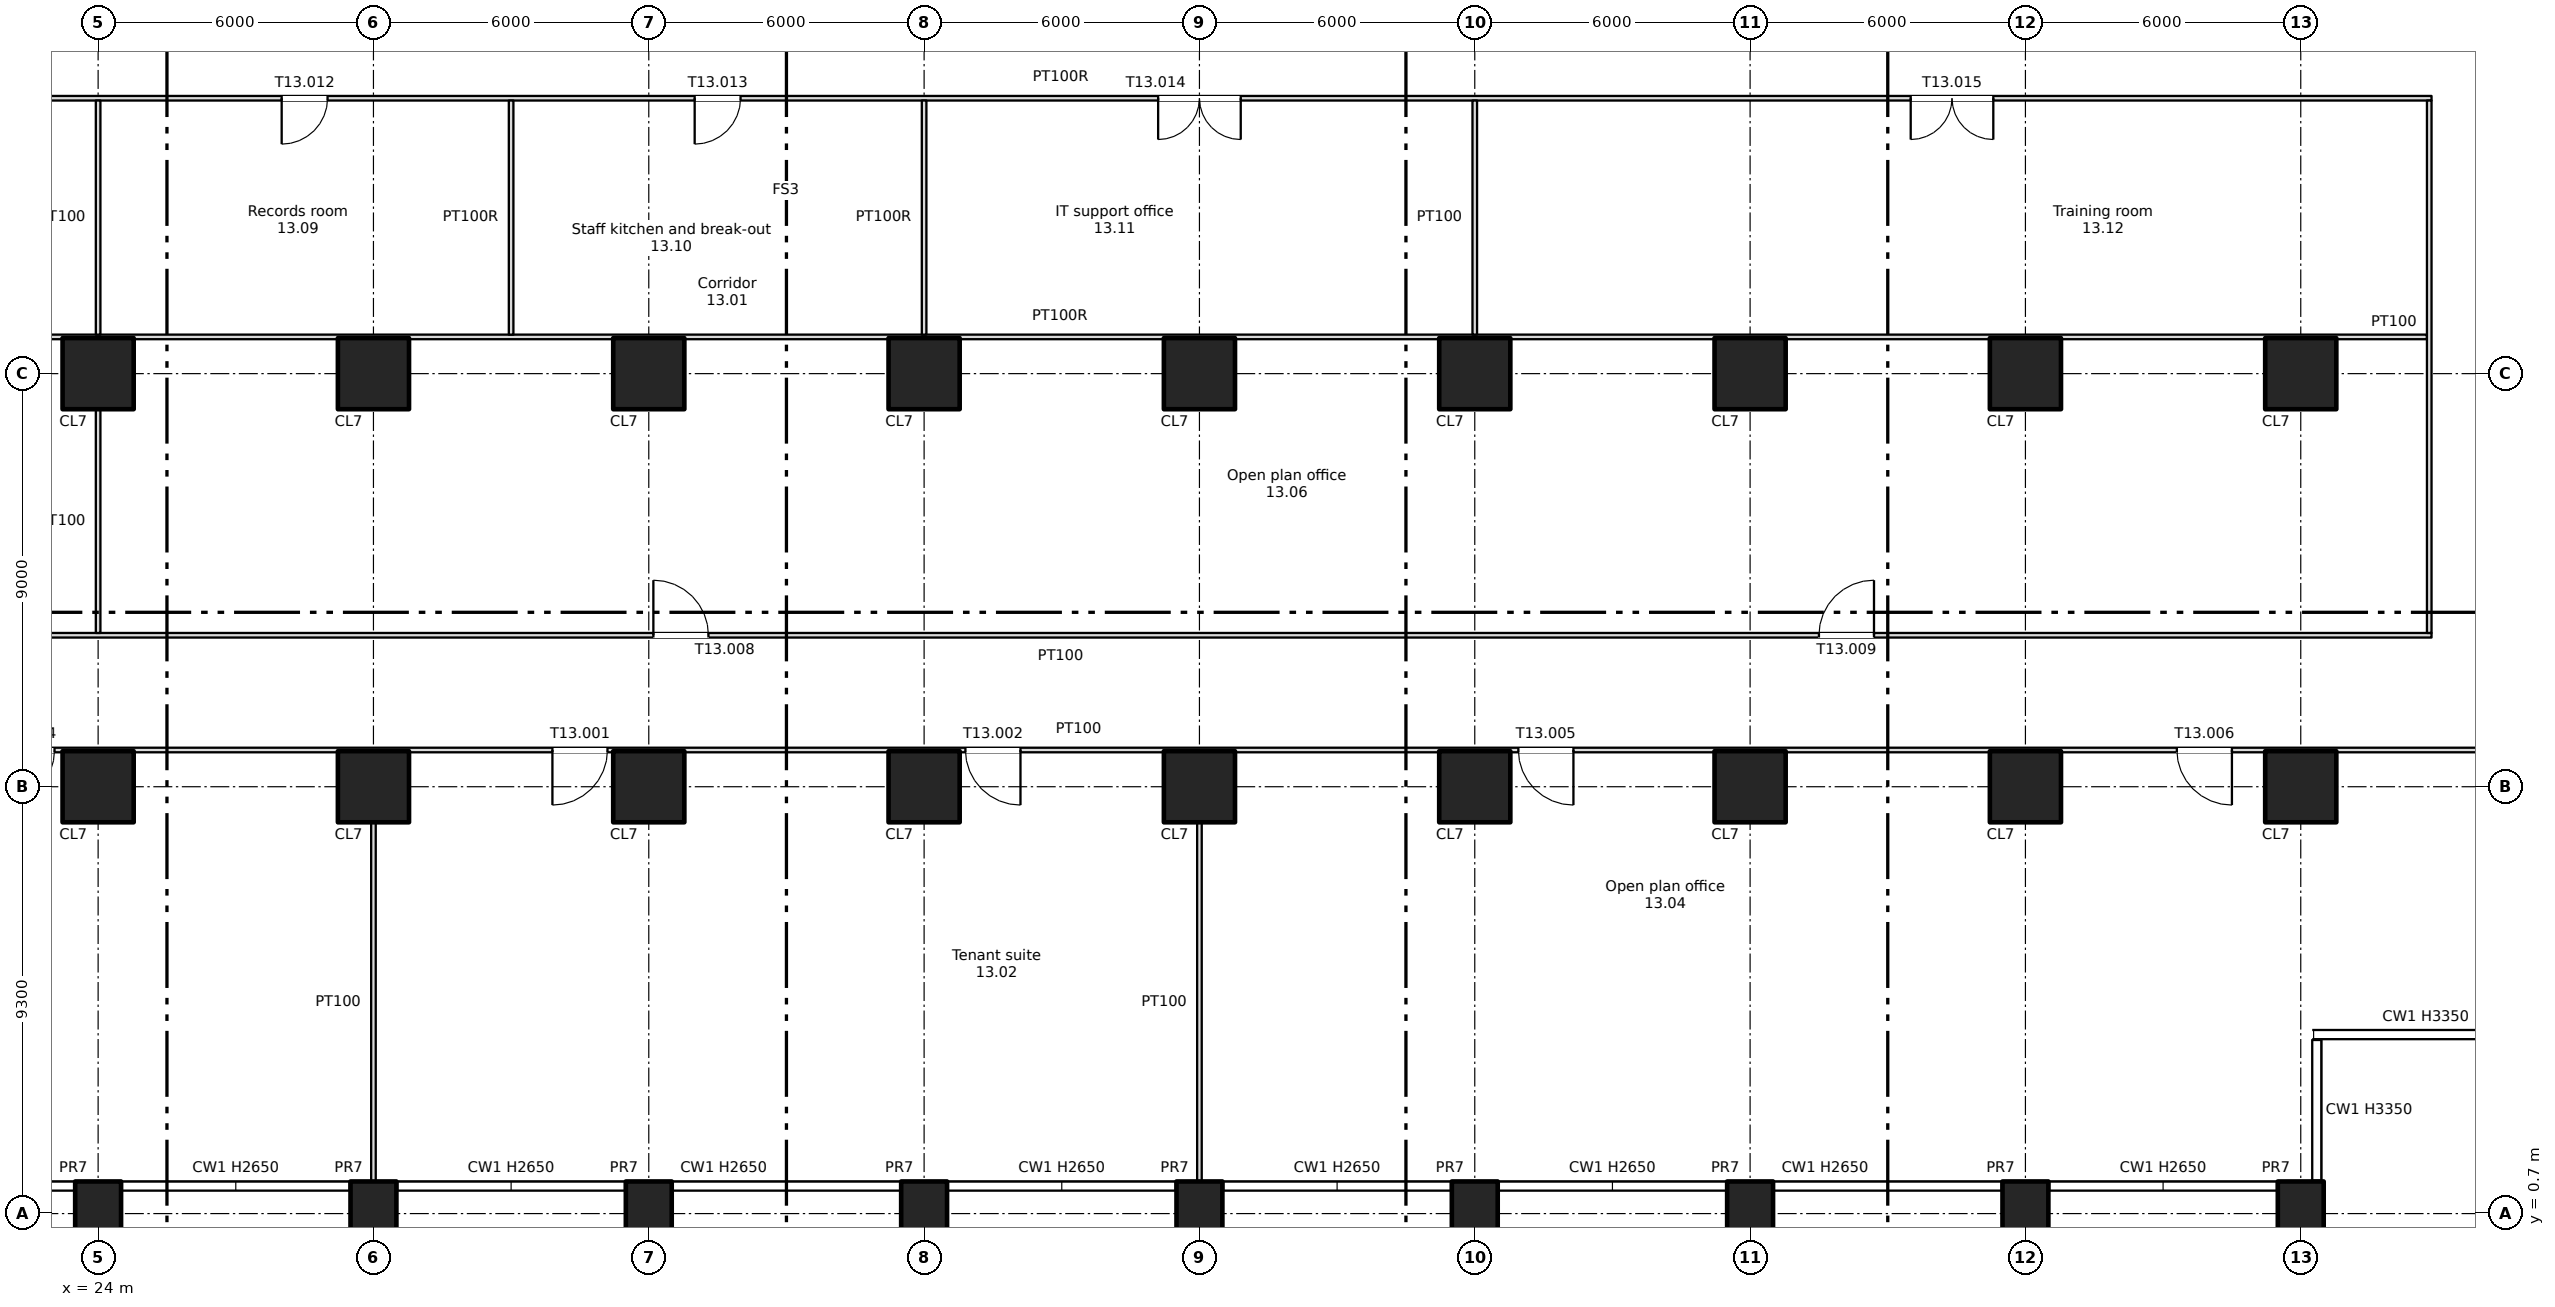
"""IFC4 building model, lengths in metres.
Left out: names, types, materials, properties, quantities, classifications, styles, units other than length and angle.
Written with IfcOpenShell. Run it as: python <this file> out.ifc"""

import sys

from ifc_helpers import new_model, si_unit, direction, frame, frame_2d, origin, origin_2d, place, context, subcontext, project, spatial, rectangle, extrude, element, fill, save


model = new_model("IFC4")
c1 = context("Model", 3, precision=1e-05, world=origin(), true_north=direction((0.0, 1.0)))
c2 = subcontext(c1, "Body", "Model", "MODEL_VIEW")
j1 = project(units=[si_unit("LENGTHUNIT", "METRE"), si_unit("PLANEANGLEUNIT", "RADIAN")], contexts=[c1])
p1 = place(None, origin())
s1 = spatial("IfcSite", under=j1, at=p1, CompositionType="ELEMENT")
p2 = place(p1, origin())
s2 = spatial("IfcBuilding", under=s1, at=p2, CompositionType="ELEMENT")
p3 = place(p2, frame((0.0, 0.0, 75.0)))
s3 = spatial("IfcBuildingStorey", under=s2, at=p3, CompositionType="ELEMENT", Elevation=75.0)
for number, where, z_axis, x_axis in (
    (1, (24.0, 0.7, -0.4), (0.0, 0.0, 1.0), (1.0, 0.0, 0.0)),
    (2, (30.0, 0.7, -0.4), (0.0, 0.0, 1.0), (1.0, 0.0, 0.0)),
    (3, (36.0, 0.7, -0.4), (0.0, 0.0, 1.0), (1.0, 0.0, 0.0)),
    (4, (42.0, 0.7, -0.4), (0.0, 0.0, 1.0), (1.0, 0.0, 0.0)),
    (5, (48.0, 0.7, -0.4), (0.0, 0.0, 1.0), (1.0, 0.0, 0.0)),
    (6, (54.0, 0.7, -0.4), (0.0, 0.0, 1.0), (1.0, 0.0, 0.0)),
    (7, (60.0, 0.7, -0.4), (0.0, 0.0, 1.0), (1.0, 0.0, 0.0)),
    (8, (66.0, 0.7, -0.4), (0.0, 0.0, 1.0), (1.0, 0.0, 0.0)),
    (9, (72.0, 0.7, -0.4), (0.0, 0.0, 1.0), (1.0, 0.0, 0.0)),
):
    element("IfcColumn", number, at=place(p3, frame(where, z_axis=z_axis, x_axis=x_axis)), inside=s3, PredefinedType="COLUMN", context=c2, shape_type="SweptSolid", body=[
        extrude(rectangle(XDim=1.0, YDim=1.4, at=origin_2d()), origin(), (0.0, 0.0, 1.0), 3.75),
    ])
for number, where, z_axis, x_axis in (
    (10, (24.0, 10.0, 0.0), (0.0, 0.0, 1.0), (1.0, 0.0, 0.0)),
    (11, (24.0, 19.0, 0.0), (0.0, 0.0, 1.0), (1.0, 0.0, 0.0)),
    (12, (30.0, 10.0, 0.0), (0.0, 0.0, 1.0), (1.0, 0.0, 0.0)),
    (13, (30.0, 19.0, 0.0), (0.0, 0.0, 1.0), (1.0, 0.0, 0.0)),
    (14, (36.0, 10.0, 0.0), (0.0, 0.0, 1.0), (1.0, 0.0, 0.0)),
    (15, (36.0, 19.0, 0.0), (0.0, 0.0, 1.0), (1.0, 0.0, 0.0)),
    (16, (42.0, 10.0, 0.0), (0.0, 0.0, 1.0), (1.0, 0.0, 0.0)),
    (17, (42.0, 19.0, 0.0), (0.0, 0.0, 1.0), (1.0, 0.0, 0.0)),
    (18, (48.0, 10.0, 0.0), (0.0, 0.0, 1.0), (1.0, 0.0, 0.0)),
    (19, (48.0, 19.0, 0.0), (0.0, 0.0, 1.0), (1.0, 0.0, 0.0)),
    (20, (54.0, 10.0, 0.0), (0.0, 0.0, 1.0), (1.0, 0.0, 0.0)),
    (21, (54.0, 19.0, 0.0), (0.0, 0.0, 1.0), (1.0, 0.0, 0.0)),
    (22, (60.0, 10.0, 0.0), (0.0, 0.0, 1.0), (1.0, 0.0, 0.0)),
    (23, (60.0, 19.0, 0.0), (0.0, 0.0, 1.0), (1.0, 0.0, 0.0)),
    (24, (66.0, 10.0, 0.0), (0.0, 0.0, 1.0), (1.0, 0.0, 0.0)),
    (25, (66.0, 19.0, 0.0), (0.0, 0.0, 1.0), (1.0, 0.0, 0.0)),
    (26, (72.0, 10.0, 0.0), (0.0, 0.0, 1.0), (1.0, 0.0, 0.0)),
    (27, (72.0, 19.0, 0.0), (0.0, 0.0, 1.0), (1.0, 0.0, 0.0)),
):
    element("IfcColumn", number, at=place(p3, frame(where, z_axis=z_axis, x_axis=x_axis)), inside=s3, PredefinedType="COLUMN", context=c2, shape_type="SweptSolid", body=[
        extrude(rectangle(XDim=1.55, YDim=1.55, at=origin_2d()), origin(), (0.0, 0.0, 1.0), 3.35),
    ])
p4 = place(p3, frame((0.8, 10.8, 0.0), z_axis=(0.0, 0.0, 1.0), x_axis=(1.0, 0.0, 0.0)))
e28 = element("IfcWall", 28, at=p4, inside=s3, PredefinedType="PARTITIONING", context=c2, shape_type="SweptSolid", body=[
    extrude(rectangle(XDim=76.4, YDim=0.1, at=frame_2d((38.2, 0.0))), origin(), (0.0, 0.0, 1.0), 3.35),
])
p5 = place(p4, frame((33.1, 0.0, 0.0)))
e29 = element("IfcOpeningElement", 29, at=p5, cuts=e28, PredefinedType="OPENING", context=c2, shape_type="SweptSolid", body=[
    extrude(rectangle(XDim=1.2, YDim=2.1, at=frame_2d((0.6, 1.05))), frame((0.0, 0.06, 0.0), z_axis=(0.0, -1.0, 0.0), x_axis=(1.0, 0.0, 0.0)), (0.0, 0.0, 1.0), 0.12),
])
p6 = place(p4, frame((42.1, 0.0, 0.0)))
e30 = element("IfcOpeningElement", 30, at=p6, cuts=e28, PredefinedType="OPENING", context=c2, shape_type="SweptSolid", body=[
    extrude(rectangle(XDim=1.2, YDim=2.1, at=frame_2d((0.6, 1.05))), frame((0.0, 0.06, 0.0), z_axis=(0.0, -1.0, 0.0), x_axis=(1.0, 0.0, 0.0)), (0.0, 0.0, 1.0), 0.12),
])
p7 = place(p4, frame((6.7, 0.0, 0.0)))
e31 = element("IfcOpeningElement", 31, at=p7, cuts=e28, PredefinedType="OPENING", context=c2, shape_type="SweptSolid", body=[
    extrude(rectangle(XDim=1.2, YDim=2.1, at=frame_2d((0.6, 1.05))), frame((0.0, 0.06, 0.0), z_axis=(0.0, -1.0, 0.0), x_axis=(1.0, 0.0, 0.0)), (0.0, 0.0, 1.0), 0.12),
])
p8 = place(p4, frame((21.05, 0.0, 0.0)))
e32 = element("IfcOpeningElement", 32, at=p8, cuts=e28, PredefinedType="OPENING", context=c2, shape_type="SweptSolid", body=[
    extrude(rectangle(XDim=1.2, YDim=2.1, at=frame_2d((0.6, 1.05))), frame((0.0, 0.06, 0.0), z_axis=(0.0, -1.0, 0.0), x_axis=(1.0, 0.0, 0.0)), (0.0, 0.0, 1.0), 0.12),
])
p9 = place(p4, frame((54.15, 0.0, 0.0)))
e33 = element("IfcOpeningElement", 33, at=p9, cuts=e28, PredefinedType="OPENING", context=c2, shape_type="SweptSolid", body=[
    extrude(rectangle(XDim=1.2, YDim=2.1, at=frame_2d((0.6, 1.05))), frame((0.0, 0.06, 0.0), z_axis=(0.0, -1.0, 0.0), x_axis=(1.0, 0.0, 0.0)), (0.0, 0.0, 1.0), 0.12),
])
p10 = place(p4, frame((68.5, 0.0, 0.0)))
e34 = element("IfcOpeningElement", 34, at=p10, cuts=e28, PredefinedType="OPENING", context=c2, shape_type="SweptSolid", body=[
    extrude(rectangle(XDim=1.2, YDim=2.1, at=frame_2d((0.6, 1.05))), frame((0.0, 0.06, 0.0), z_axis=(0.0, -1.0, 0.0), x_axis=(1.0, 0.0, 0.0)), (0.0, 0.0, 1.0), 0.12),
])
p11 = place(p3, frame((3.15, 13.3, 0.0), z_axis=(0.0, 0.0, 1.0), x_axis=(1.0, 0.0, 0.0)))
e35 = element("IfcWall", 35, at=p11, inside=s3, PredefinedType="PARTITIONING", context=c2, shape_type="SweptSolid", body=[
    extrude(rectangle(XDim=71.7, YDim=0.1, at=frame_2d((35.85, 0.0))), origin(), (0.0, 0.0, 1.0), 3.35),
])
p12 = place(p11, frame((9.55, 0.0, 0.0)))
e36 = element("IfcOpeningElement", 36, at=p12, cuts=e35, PredefinedType="OPENING", context=c2, shape_type="SweptSolid", body=[
    extrude(rectangle(XDim=1.8, YDim=2.1, at=frame_2d((0.9, 1.05))), frame((0.0, 0.06, 0.0), z_axis=(0.0, -1.0, 0.0), x_axis=(1.0, 0.0, 0.0)), (0.0, 0.0, 1.0), 0.12),
])
p13 = place(p11, frame((32.95, 0.0, 0.0)))
e37 = element("IfcOpeningElement", 37, at=p13, cuts=e35, PredefinedType="OPENING", context=c2, shape_type="SweptSolid", body=[
    extrude(rectangle(XDim=1.2, YDim=2.1, at=frame_2d((0.6, 1.05))), frame((0.0, 0.06, 0.0), z_axis=(0.0, -1.0, 0.0), x_axis=(1.0, 0.0, 0.0)), (0.0, 0.0, 1.0), 0.12),
])
p14 = place(p11, frame((58.35, 0.0, 0.0)))
e38 = element("IfcOpeningElement", 38, at=p14, cuts=e35, PredefinedType="OPENING", context=c2, shape_type="SweptSolid", body=[
    extrude(rectangle(XDim=1.2, YDim=2.1, at=frame_2d((0.6, 1.05))), frame((0.0, 0.06, 0.0), z_axis=(0.0, -1.0, 0.0), x_axis=(1.0, 0.0, 0.0)), (0.0, 0.0, 1.0), 0.12),
])
p15 = place(p3, frame((3.25, 19.8, 0.0), z_axis=(0.0, 0.0, 1.0), x_axis=(1.0, 0.0, 0.0)))
e39 = element("IfcWall", 39, at=p15, inside=s3, PredefinedType="PARTITIONING", context=c2, shape_type="SweptSolid", body=[
    extrude(rectangle(XDim=71.5, YDim=0.1, at=frame_2d((35.75, 0.0))), origin(), (0.0, 0.0, 1.0), 3.35),
])
p16 = place(p3, frame((3.15, 25.0, 0.0), z_axis=(0.0, 0.0, 1.0), x_axis=(1.0, 0.0, 0.0)))
e40 = element("IfcWall", 40, at=p16, inside=s3, PredefinedType="PARTITIONING", context=c2, shape_type="SweptSolid", body=[
    extrude(rectangle(XDim=71.7, YDim=0.1, at=frame_2d((35.85, 0.0))), origin(), (0.0, 0.0, 1.0), 3.35),
])
p17 = place(p16, frame((3.95, 0.0, 0.0)))
e41 = element("IfcOpeningElement", 41, at=p17, cuts=e40, PredefinedType="OPENING", context=c2, shape_type="SweptSolid", body=[
    extrude(rectangle(XDim=1.0, YDim=2.1, at=frame_2d((0.5, 1.05))), frame((0.0, 0.06, 0.0), z_axis=(0.0, -1.0, 0.0), x_axis=(1.0, 0.0, 0.0)), (0.0, 0.0, 1.0), 0.12),
])
p18 = place(p16, frame((13.95, 0.0, 0.0)))
e42 = element("IfcOpeningElement", 42, at=p18, cuts=e40, PredefinedType="OPENING", context=c2, shape_type="SweptSolid", body=[
    extrude(rectangle(XDim=1.8, YDim=2.1, at=frame_2d((0.9, 1.05))), frame((0.0, 0.06, 0.0), z_axis=(0.0, -1.0, 0.0), x_axis=(1.0, 0.0, 0.0)), (0.0, 0.0, 1.0), 0.12),
])
p19 = place(p16, frame((24.85, 0.0, 0.0)))
e43 = element("IfcOpeningElement", 43, at=p19, cuts=e40, PredefinedType="OPENING", context=c2, shape_type="SweptSolid", body=[
    extrude(rectangle(XDim=1.0, YDim=2.1, at=frame_2d((0.5, 1.05))), frame((0.0, 0.06, 0.0), z_axis=(0.0, -1.0, 0.0), x_axis=(1.0, 0.0, 0.0)), (0.0, 0.0, 1.0), 0.12),
])
p20 = place(p16, frame((33.85, 0.0, 0.0)))
e44 = element("IfcOpeningElement", 44, at=p20, cuts=e40, PredefinedType="OPENING", context=c2, shape_type="SweptSolid", body=[
    extrude(rectangle(XDim=1.0, YDim=2.1, at=frame_2d((0.5, 1.05))), frame((0.0, 0.06, 0.0), z_axis=(0.0, -1.0, 0.0), x_axis=(1.0, 0.0, 0.0)), (0.0, 0.0, 1.0), 0.12),
])
p21 = place(p16, frame((43.95, 0.0, 0.0)))
e45 = element("IfcOpeningElement", 45, at=p21, cuts=e40, PredefinedType="OPENING", context=c2, shape_type="SweptSolid", body=[
    extrude(rectangle(XDim=1.8, YDim=2.1, at=frame_2d((0.9, 1.05))), frame((0.0, 0.06, 0.0), z_axis=(0.0, -1.0, 0.0), x_axis=(1.0, 0.0, 0.0)), (0.0, 0.0, 1.0), 0.12),
])
p22 = place(p16, frame((60.35, 0.0, 0.0)))
e46 = element("IfcOpeningElement", 46, at=p22, cuts=e40, PredefinedType="OPENING", context=c2, shape_type="SweptSolid", body=[
    extrude(rectangle(XDim=1.8, YDim=2.1, at=frame_2d((0.9, 1.05))), frame((0.0, 0.06, 0.0), z_axis=(0.0, -1.0, 0.0), x_axis=(1.0, 0.0, 0.0)), (0.0, 0.0, 1.0), 0.12),
])
p23 = place(p3, frame((24.0, 13.35, 0.0), z_axis=(0.0, 0.0, 1.0), x_axis=(0.0, 1.0, 0.0)))
e47 = element("IfcWall", 47, at=p23, inside=s3, PredefinedType="PARTITIONING", context=c2, shape_type="SweptSolid", body=[
    extrude(rectangle(XDim=4.875, YDim=0.1, at=frame_2d((2.438, 0.0))), origin(), (0.0, 0.0, 1.0), 3.35),
])
p24 = place(p3, frame((24.0, 19.85, 0.0), z_axis=(0.0, 0.0, 1.0), x_axis=(0.0, 1.0, 0.0)))
e48 = element("IfcWall", 48, at=p24, inside=s3, PredefinedType="PARTITIONING", context=c2, shape_type="SweptSolid", body=[
    extrude(rectangle(XDim=5.1, YDim=0.1, at=frame_2d((2.55, 0.0))), origin(), (0.0, 0.0, 1.0), 3.35),
])
p25 = place(p3, frame((30.0, 1.4, 0.0), z_axis=(0.0, 0.0, 1.0), x_axis=(0.0, 1.0, 0.0)))
e49 = element("IfcWall", 49, at=p25, inside=s3, PredefinedType="PARTITIONING", context=c2, shape_type="SweptSolid", body=[
    extrude(rectangle(XDim=7.825, YDim=0.1, at=frame_2d((3.913, 0.0))), origin(), (0.0, 0.0, 1.0), 3.35),
])
for number, where, z_axis, x_axis in (
    (50, (33.0, 19.85, 0.0), (0.0, 0.0, 1.0), (0.0, 1.0, 0.0)),
    (51, (42.0, 19.85, 0.0), (0.0, 0.0, 1.0), (0.0, 1.0, 0.0)),
):
    element("IfcWall", number, at=place(p3, frame(where, z_axis=z_axis, x_axis=x_axis)), inside=s3, PredefinedType="PARTITIONING", context=c2, shape_type="SweptSolid", body=[
        extrude(rectangle(XDim=5.1, YDim=0.1, at=frame_2d((2.55, 0.0))), origin(), (0.0, 0.0, 1.0), 3.35),
    ])
p26 = place(p3, frame((48.0, 1.4, 0.0), z_axis=(0.0, 0.0, 1.0), x_axis=(0.0, 1.0, 0.0)))
e52 = element("IfcWall", 52, at=p26, inside=s3, PredefinedType="PARTITIONING", context=c2, shape_type="SweptSolid", body=[
    extrude(rectangle(XDim=7.825, YDim=0.1, at=frame_2d((3.913, 0.0))), origin(), (0.0, 0.0, 1.0), 3.35),
])
p27 = place(p3, frame((54.0, 19.85, 0.0), z_axis=(0.0, 0.0, 1.0), x_axis=(0.0, 1.0, 0.0)))
e53 = element("IfcWall", 53, at=p27, inside=s3, PredefinedType="PARTITIONING", context=c2, shape_type="SweptSolid", body=[
    extrude(rectangle(XDim=5.1, YDim=0.1, at=frame_2d((2.55, 0.0))), origin(), (0.0, 0.0, 1.0), 3.35),
])
p28 = place(p3, frame((74.8, 13.35, 0.0), z_axis=(0.0, 0.0, 1.0), x_axis=(0.0, 1.0, 0.0)))
e54 = element("IfcWall", 54, at=p28, inside=s3, PredefinedType="PARTITIONING", context=c2, shape_type="SweptSolid", body=[
    extrude(rectangle(XDim=11.6, YDim=0.1, at=frame_2d((5.8, 0.0))), origin(), (0.0, 0.0, 1.0), 3.35),
])
p29 = place(p5, origin())
e55 = element("IfcDoor", 55, at=p29, inside=s3, OperationType="SINGLE_SWING_LEFT", PredefinedType="DOOR", context=c2, shape_type="SweptSolid", body=[
    extrude(rectangle(XDim=1.2, YDim=2.1, at=frame_2d((0.6, 1.05))), frame((0.0, 0.025, 0.0), z_axis=(0.0, -1.0, 0.0), x_axis=(1.0, 0.0, 0.0)), (0.0, 0.0, 1.0), 0.05),
])
fill(e29, e55)
p30 = place(p6, origin())
e56 = element("IfcDoor", 56, at=p30, inside=s3, OperationType="SINGLE_SWING_RIGHT", PredefinedType="DOOR", context=c2, shape_type="SweptSolid", body=[
    extrude(rectangle(XDim=1.2, YDim=2.1, at=frame_2d((0.6, 1.05))), frame((0.0, 0.025, 0.0), z_axis=(0.0, -1.0, 0.0), x_axis=(1.0, 0.0, 0.0)), (0.0, 0.0, 1.0), 0.05),
])
fill(e30, e56)
p31 = place(p8, origin())
e57 = element("IfcDoor", 57, at=p31, inside=s3, OperationType="SINGLE_SWING_LEFT", PredefinedType="DOOR", context=c2, shape_type="SweptSolid", body=[
    extrude(rectangle(XDim=1.2, YDim=2.1, at=frame_2d((0.6, 1.05))), frame((0.0, 0.025, 0.0), z_axis=(0.0, -1.0, 0.0), x_axis=(1.0, 0.0, 0.0)), (0.0, 0.0, 1.0), 0.05),
])
fill(e32, e57)
p32 = place(p9, origin())
e58 = element("IfcDoor", 58, at=p32, inside=s3, OperationType="SINGLE_SWING_RIGHT", PredefinedType="DOOR", context=c2, shape_type="SweptSolid", body=[
    extrude(rectangle(XDim=1.2, YDim=2.1, at=frame_2d((0.6, 1.05))), frame((0.0, 0.025, 0.0), z_axis=(0.0, -1.0, 0.0), x_axis=(1.0, 0.0, 0.0)), (0.0, 0.0, 1.0), 0.05),
])
fill(e33, e58)
p33 = place(p10, origin())
e59 = element("IfcDoor", 59, at=p33, inside=s3, OperationType="SINGLE_SWING_RIGHT", PredefinedType="DOOR", context=c2, shape_type="SweptSolid", body=[
    extrude(rectangle(XDim=1.2, YDim=2.1, at=frame_2d((0.6, 1.05))), frame((0.0, 0.025, 0.0), z_axis=(0.0, -1.0, 0.0), x_axis=(1.0, 0.0, 0.0)), (0.0, 0.0, 1.0), 0.05),
])
fill(e34, e59)
p34 = place(p13, origin())
e60 = element("IfcDoor", 60, at=p34, inside=s3, OperationType="SINGLE_SWING_LEFT", PredefinedType="DOOR", context=c2, shape_type="SweptSolid", body=[
    extrude(rectangle(XDim=1.2, YDim=2.1, at=frame_2d((0.6, 1.05))), frame((0.0, 0.025, 0.0), z_axis=(0.0, -1.0, 0.0), x_axis=(1.0, 0.0, 0.0)), (0.0, 0.0, 1.0), 0.05),
])
fill(e37, e60)
p35 = place(p14, origin())
e61 = element("IfcDoor", 61, at=p35, inside=s3, OperationType="SINGLE_SWING_RIGHT", PredefinedType="DOOR", context=c2, shape_type="SweptSolid", body=[
    extrude(rectangle(XDim=1.2, YDim=2.1, at=frame_2d((0.6, 1.05))), frame((0.0, 0.025, 0.0), z_axis=(0.0, -1.0, 0.0), x_axis=(1.0, 0.0, 0.0)), (0.0, 0.0, 1.0), 0.05),
])
fill(e38, e61)
p36 = place(p19, origin())
e62 = element("IfcDoor", 62, at=p36, inside=s3, OperationType="SINGLE_SWING_LEFT", PredefinedType="DOOR", context=c2, shape_type="SweptSolid", body=[
    extrude(rectangle(XDim=1.0, YDim=2.1, at=frame_2d((0.5, 1.05))), frame((0.0, 0.025, 0.0), z_axis=(0.0, -1.0, 0.0), x_axis=(1.0, 0.0, 0.0)), (0.0, 0.0, 1.0), 0.05),
])
fill(e43, e62)
p37 = place(p20, origin())
e63 = element("IfcDoor", 63, at=p37, inside=s3, OperationType="SINGLE_SWING_LEFT", PredefinedType="DOOR", context=c2, shape_type="SweptSolid", body=[
    extrude(rectangle(XDim=1.0, YDim=2.1, at=frame_2d((0.5, 1.05))), frame((0.0, 0.025, 0.0), z_axis=(0.0, -1.0, 0.0), x_axis=(1.0, 0.0, 0.0)), (0.0, 0.0, 1.0), 0.05),
])
fill(e44, e63)
p38 = place(p21, origin())
e64 = element("IfcDoor", 64, at=p38, inside=s3, OperationType="DOUBLE_DOOR_SINGLE_SWING", PredefinedType="DOOR", context=c2, shape_type="SweptSolid", body=[
    extrude(rectangle(XDim=1.8, YDim=2.1, at=frame_2d((0.9, 1.05))), frame((0.0, 0.025, 0.0), z_axis=(0.0, -1.0, 0.0), x_axis=(1.0, 0.0, 0.0)), (0.0, 0.0, 1.0), 0.05),
])
fill(e45, e64)
p39 = place(p22, origin())
e65 = element("IfcDoor", 65, at=p39, inside=s3, OperationType="DOUBLE_DOOR_SINGLE_SWING", PredefinedType="DOOR", context=c2, shape_type="SweptSolid", body=[
    extrude(rectangle(XDim=1.8, YDim=2.1, at=frame_2d((0.9, 1.05))), frame((0.0, 0.025, 0.0), z_axis=(0.0, -1.0, 0.0), x_axis=(1.0, 0.0, 0.0)), (0.0, 0.0, 1.0), 0.05),
])
fill(e46, e65)
save(model, sys.argv[1])
